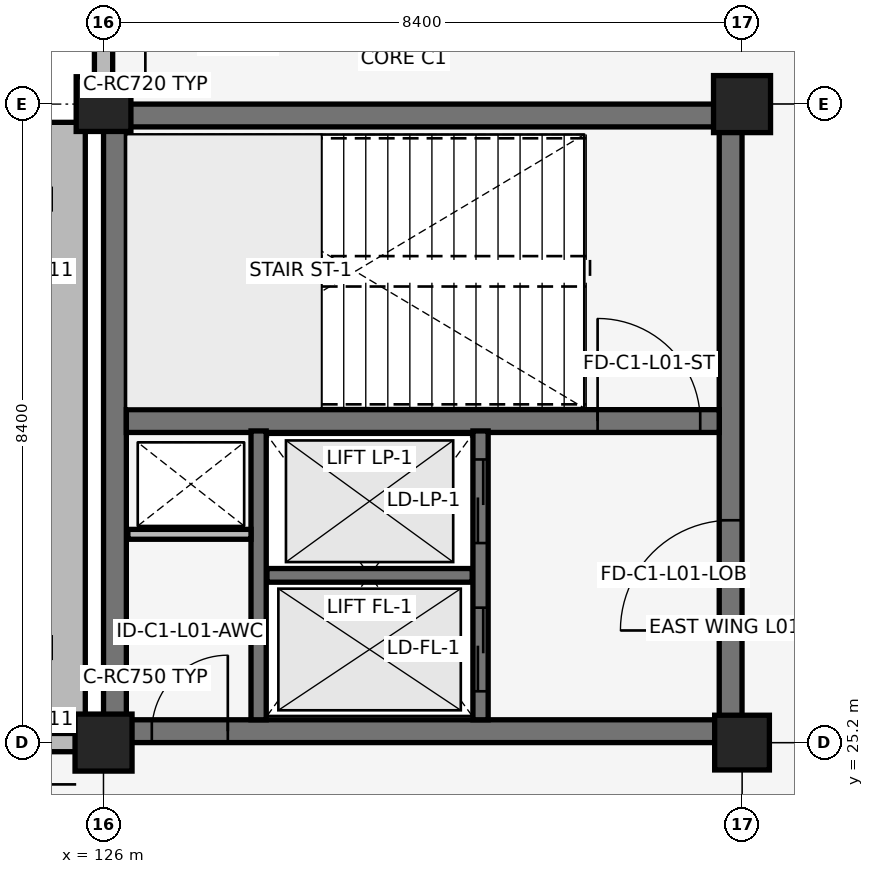
"""IFC4 building model, lengths in metres.
Left out: names, types, materials, properties, quantities, classifications, styles, units other than length and angle.
Written with IfcOpenShell. Run it as: python <this file> out.ifc"""

import sys

from ifc_helpers import new_model, si_unit, direction, frame, frame_2d, origin, origin_2d, place, context, subcontext, project, spatial, rectangle, extrude, element, fill, save


model = new_model("IFC4")
c1 = context("Model", 3, precision=1e-05, world=origin(), true_north=direction((0.0, 1.0)))
c2 = subcontext(c1, "Body", "Model", "MODEL_VIEW")
j1 = project(units=[si_unit("LENGTHUNIT", "METRE"), si_unit("PLANEANGLEUNIT", "RADIAN")], contexts=[c1])
p1 = place(None, origin())
s1 = spatial("IfcSite", under=j1, at=p1, CompositionType="ELEMENT")
p2 = place(p1, origin())
s2 = spatial("IfcBuilding", under=s1, at=p2, CompositionType="ELEMENT")
p3 = place(p2, frame((0.0, 0.0, 5.44)))
s3 = spatial("IfcBuildingStorey", under=s2, at=p3, CompositionType="ELEMENT", Elevation=5.44)
p4 = place(p3, frame((126.15, 25.35, 0.0), z_axis=(0.0, 0.0, 1.0), x_axis=(1.0, 0.0, 0.0)))
e1 = element("IfcWall", 1, at=p4, inside=s3, PredefinedType="SHEAR", context=c2, shape_type="SweptSolid", body=[
    extrude(rectangle(XDim=8.1, YDim=0.3, at=frame_2d((4.05, 0.0))), origin(), (0.0, 0.0, 1.0), 4.12),
])
p5 = place(p4, frame((0.485, 0.0, 0.0)))
e2 = element("IfcOpeningElement", 2, at=p5, cuts=e1, PredefinedType="OPENING", context=c2, shape_type="SweptSolid", body=[
    extrude(rectangle(XDim=1.0, YDim=2.15, at=frame_2d((0.5, 1.075))), frame((0.0, 0.16, 0.0), z_axis=(0.0, -1.0, 0.0), x_axis=(1.0, 0.0, 0.0)), (0.0, 0.0, 1.0), 0.32),
])
p6 = place(p3, frame((126.15, 33.45, 0.0), z_axis=(0.0, 0.0, 1.0), x_axis=(1.0, 0.0, 0.0)))
e3 = element("IfcWall", 3, at=p6, inside=s3, PredefinedType="SHEAR", context=c2, shape_type="SweptSolid", body=[
    extrude(rectangle(XDim=8.1, YDim=0.3, at=frame_2d((4.05, 0.0))), origin(), (0.0, 0.0, 1.0), 4.12),
])
p7 = place(p3, frame((126.15, 25.35, 0.0), z_axis=(0.0, 0.0, 1.0), x_axis=(0.0, 1.0, 0.0)))
e4 = element("IfcWall", 4, at=p7, inside=s3, PredefinedType="SHEAR", context=c2, shape_type="SweptSolid", body=[
    extrude(rectangle(XDim=8.1, YDim=0.3, at=frame_2d((4.05, 0.0))), origin(), (0.0, 0.0, 1.0), 4.12),
])
p8 = place(p3, frame((134.25, 25.35, 0.0), z_axis=(0.0, 0.0, 1.0), x_axis=(0.0, 1.0, 0.0)))
e5 = element("IfcWall", 5, at=p8, inside=s3, PredefinedType="SHEAR", context=c2, shape_type="SweptSolid", body=[
    extrude(rectangle(XDim=8.1, YDim=0.3, at=frame_2d((4.05, 0.0))), origin(), (0.0, 0.0, 1.0), 4.12),
])
p9 = place(p8, frame((1.325, 0.0, 0.0)))
e6 = element("IfcOpeningElement", 6, at=p9, cuts=e5, PredefinedType="OPENING", context=c2, shape_type="SweptSolid", body=[
    extrude(rectangle(XDim=1.45, YDim=2.15, at=frame_2d((0.725, 1.075))), frame((0.0, 0.16, 0.0), z_axis=(0.0, -1.0, 0.0), x_axis=(1.0, 0.0, 0.0)), (0.0, 0.0, 1.0), 0.32),
])
p10 = place(p3, frame((126.3, 29.43, 0.0), z_axis=(0.0, 0.0, 1.0), x_axis=(1.0, 0.0, 0.0)))
e7 = element("IfcWall", 7, at=p10, inside=s3, PredefinedType="SHEAR", context=c2, shape_type="SweptSolid", body=[
    extrude(rectangle(XDim=7.8, YDim=0.3, at=frame_2d((3.9, 0.0))), origin(), (0.0, 0.0, 1.0), 4.12),
])
p11 = place(p10, frame((6.2, 0.0, 0.0)))
e8 = element("IfcOpeningElement", 8, at=p11, cuts=e7, PredefinedType="OPENING", context=c2, shape_type="SweptSolid", body=[
    extrude(rectangle(XDim=1.35, YDim=2.15, at=frame_2d((0.675, 1.075))), frame((0.0, 0.16, 0.0), z_axis=(0.0, -1.0, 0.0), x_axis=(1.0, 0.0, 0.0)), (0.0, 0.0, 1.0), 0.32),
])
p12 = place(p3, frame((126.0, 25.2, 0.0), z_axis=(0.0, 0.0, 1.0), x_axis=(1.0, 0.0, 0.0)))
e9 = element("IfcColumn", 9, at=p12, inside=s3, PredefinedType="COLUMN", context=c2, shape_type="SweptSolid", body=[
    extrude(rectangle(XDim=0.75, YDim=0.75, at=origin_2d()), origin(), (0.0, 0.0, 1.0), 4.12),
])
for number, where, z_axis, x_axis in (
    (10, (126.0, 33.6, 0.0), (0.0, 0.0, 1.0), (1.0, 0.0, 0.0)),
    (11, (134.4, 25.2, 0.0), (0.0, 0.0, 1.0), (1.0, 0.0, 0.0)),
):
    element("IfcColumn", number, at=place(p3, frame(where, z_axis=z_axis, x_axis=x_axis)), inside=s3, PredefinedType="COLUMN", context=c2, shape_type="SweptSolid", body=[
        extrude(rectangle(XDim=0.72, YDim=0.72, at=origin_2d()), origin(), (0.0, 0.0, 1.0), 4.12),
    ])
p13 = place(p3, frame((134.4, 33.6, 0.0), z_axis=(0.0, 0.0, 1.0), x_axis=(1.0, 0.0, 0.0)))
e12 = element("IfcColumn", 12, at=p13, inside=s3, PredefinedType="COLUMN", context=c2, shape_type="SweptSolid", body=[
    extrude(rectangle(XDim=0.75, YDim=0.75, at=origin_2d()), origin(), (0.0, 0.0, 1.0), 4.12),
])
p14 = place(p3, frame((117.845, 25.2, 0.0), z_axis=(0.0, 0.0, 1.0), x_axis=(1.0, 0.0, 0.0)))
e13 = element("IfcWall", 13, at=p14, inside=s3, PredefinedType="SOLIDWALL", context=c2, shape_type="SweptSolid", body=[
    extrude(rectangle(XDim=7.795, YDim=0.24, at=frame_2d((3.897, 0.0))), origin(), (0.0, 0.0, 1.0), 3.37),
])
p15 = place(p14, frame((0.8, 0.0, 0.35)))
e14 = element("IfcOpeningElement", 14, at=p15, cuts=e13, PredefinedType="OPENING", context=c2, shape_type="SweptSolid", body=[
    extrude(rectangle(XDim=0.44, YDim=1.25, at=frame_2d((0.22, 0.625))), frame((0.0, 0.13, 0.0), z_axis=(0.0, -1.0, 0.0), x_axis=(1.0, 0.0, 0.0)), (0.0, 0.0, 1.0), 0.26),
])
p16 = place(p14, frame((2.239, 0.0, 0.35)))
e15 = element("IfcOpeningElement", 15, at=p16, cuts=e13, PredefinedType="OPENING", context=c2, shape_type="SweptSolid", body=[
    extrude(rectangle(XDim=0.44, YDim=1.25, at=frame_2d((0.22, 0.625))), frame((0.0, 0.13, 0.0), z_axis=(0.0, -1.0, 0.0), x_axis=(1.0, 0.0, 0.0)), (0.0, 0.0, 1.0), 0.26),
])
p17 = place(p14, frame((3.677, 0.0, 0.35)))
e16 = element("IfcOpeningElement", 16, at=p17, cuts=e13, PredefinedType="OPENING", context=c2, shape_type="SweptSolid", body=[
    extrude(rectangle(XDim=0.44, YDim=1.25, at=frame_2d((0.22, 0.625))), frame((0.0, 0.13, 0.0), z_axis=(0.0, -1.0, 0.0), x_axis=(1.0, 0.0, 0.0)), (0.0, 0.0, 1.0), 0.26),
])
p18 = place(p14, frame((5.116, 0.0, 0.35)))
e17 = element("IfcOpeningElement", 17, at=p18, cuts=e13, PredefinedType="OPENING", context=c2, shape_type="SweptSolid", body=[
    extrude(rectangle(XDim=0.44, YDim=1.25, at=frame_2d((0.22, 0.625))), frame((0.0, 0.13, 0.0), z_axis=(0.0, -1.0, 0.0), x_axis=(1.0, 0.0, 0.0)), (0.0, 0.0, 1.0), 0.26),
])
p19 = place(p14, frame((0.8, 0.0, 1.8)))
e18 = element("IfcOpeningElement", 18, at=p19, cuts=e13, PredefinedType="OPENING", context=c2, shape_type="SweptSolid", body=[
    extrude(rectangle(XDim=0.44, YDim=1.25, at=frame_2d((0.22, 0.625))), frame((0.0, 0.13, 0.0), z_axis=(0.0, -1.0, 0.0), x_axis=(1.0, 0.0, 0.0)), (0.0, 0.0, 1.0), 0.26),
])
p20 = place(p14, frame((2.239, 0.0, 1.8)))
e19 = element("IfcOpeningElement", 19, at=p20, cuts=e13, PredefinedType="OPENING", context=c2, shape_type="SweptSolid", body=[
    extrude(rectangle(XDim=0.44, YDim=1.25, at=frame_2d((0.22, 0.625))), frame((0.0, 0.13, 0.0), z_axis=(0.0, -1.0, 0.0), x_axis=(1.0, 0.0, 0.0)), (0.0, 0.0, 1.0), 0.26),
])
p21 = place(p14, frame((3.677, 0.0, 1.8)))
e20 = element("IfcOpeningElement", 20, at=p21, cuts=e13, PredefinedType="OPENING", context=c2, shape_type="SweptSolid", body=[
    extrude(rectangle(XDim=0.44, YDim=1.25, at=frame_2d((0.22, 0.625))), frame((0.0, 0.13, 0.0), z_axis=(0.0, -1.0, 0.0), x_axis=(1.0, 0.0, 0.0)), (0.0, 0.0, 1.0), 0.26),
])
p22 = place(p14, frame((5.116, 0.0, 1.8)))
e21 = element("IfcOpeningElement", 21, at=p22, cuts=e13, PredefinedType="OPENING", context=c2, shape_type="SweptSolid", body=[
    extrude(rectangle(XDim=0.44, YDim=1.25, at=frame_2d((0.22, 0.625))), frame((0.0, 0.13, 0.0), z_axis=(0.0, -1.0, 0.0), x_axis=(1.0, 0.0, 0.0)), (0.0, 0.0, 1.0), 0.26),
])
p23 = place(p3, frame((125.52, 25.44, 0.0), z_axis=(0.0, 0.0, 1.0), x_axis=(0.0, 1.0, 0.0)))
e22 = element("IfcWall", 22, at=p23, inside=s3, PredefinedType="SOLIDWALL", context=c2, shape_type="SweptSolid", body=[
    extrude(rectangle(XDim=7.92, YDim=0.48, at=frame_2d((3.96, 0.0))), origin(), (0.0, 0.0, 1.0), 4.42),
])
p24 = place(p3, frame((126.0, 33.945, 0.0), z_axis=(0.0, 0.0, 1.0), x_axis=(0.0, 1.0, 0.0)))
e23 = element("IfcWall", 23, at=p24, inside=s3, PredefinedType="SOLIDWALL", context=c2, shape_type="SweptSolid", body=[
    extrude(rectangle(XDim=7.695, YDim=0.24, at=frame_2d((3.847, 0.0))), origin(), (0.0, 0.0, 1.0), 3.37),
])
p25 = place(p24, frame((0.79, 0.0, 0.35)))
e24 = element("IfcOpeningElement", 24, at=p25, cuts=e23, PredefinedType="OPENING", context=c2, shape_type="SweptSolid", body=[
    extrude(rectangle(XDim=0.44, YDim=1.25, at=frame_2d((0.22, 0.625))), frame((0.0, 0.13, 0.0), z_axis=(0.0, -1.0, 0.0), x_axis=(1.0, 0.0, 0.0)), (0.0, 0.0, 1.0), 0.26),
])
p26 = place(p24, frame((2.208, 0.0, 0.35)))
e25 = element("IfcOpeningElement", 25, at=p26, cuts=e23, PredefinedType="OPENING", context=c2, shape_type="SweptSolid", body=[
    extrude(rectangle(XDim=0.44, YDim=1.25, at=frame_2d((0.22, 0.625))), frame((0.0, 0.13, 0.0), z_axis=(0.0, -1.0, 0.0), x_axis=(1.0, 0.0, 0.0)), (0.0, 0.0, 1.0), 0.26),
])
p27 = place(p24, frame((3.627, 0.0, 0.35)))
e26 = element("IfcOpeningElement", 26, at=p27, cuts=e23, PredefinedType="OPENING", context=c2, shape_type="SweptSolid", body=[
    extrude(rectangle(XDim=0.44, YDim=1.25, at=frame_2d((0.22, 0.625))), frame((0.0, 0.13, 0.0), z_axis=(0.0, -1.0, 0.0), x_axis=(1.0, 0.0, 0.0)), (0.0, 0.0, 1.0), 0.26),
])
p28 = place(p24, frame((5.046, 0.0, 0.35)))
e27 = element("IfcOpeningElement", 27, at=p28, cuts=e23, PredefinedType="OPENING", context=c2, shape_type="SweptSolid", body=[
    extrude(rectangle(XDim=0.44, YDim=1.25, at=frame_2d((0.22, 0.625))), frame((0.0, 0.13, 0.0), z_axis=(0.0, -1.0, 0.0), x_axis=(1.0, 0.0, 0.0)), (0.0, 0.0, 1.0), 0.26),
])
p29 = place(p24, frame((6.466, 0.0, 0.35)))
e28 = element("IfcOpeningElement", 28, at=p29, cuts=e23, PredefinedType="OPENING", context=c2, shape_type="SweptSolid", body=[
    extrude(rectangle(XDim=0.44, YDim=1.25, at=frame_2d((0.22, 0.625))), frame((0.0, 0.13, 0.0), z_axis=(0.0, -1.0, 0.0), x_axis=(1.0, 0.0, 0.0)), (0.0, 0.0, 1.0), 0.26),
])
p30 = place(p24, frame((0.79, 0.0, 1.8)))
e29 = element("IfcOpeningElement", 29, at=p30, cuts=e23, PredefinedType="OPENING", context=c2, shape_type="SweptSolid", body=[
    extrude(rectangle(XDim=0.44, YDim=1.25, at=frame_2d((0.22, 0.625))), frame((0.0, 0.13, 0.0), z_axis=(0.0, -1.0, 0.0), x_axis=(1.0, 0.0, 0.0)), (0.0, 0.0, 1.0), 0.26),
])
p31 = place(p24, frame((2.208, 0.0, 1.8)))
e30 = element("IfcOpeningElement", 30, at=p31, cuts=e23, PredefinedType="OPENING", context=c2, shape_type="SweptSolid", body=[
    extrude(rectangle(XDim=0.44, YDim=1.25, at=frame_2d((0.22, 0.625))), frame((0.0, 0.13, 0.0), z_axis=(0.0, -1.0, 0.0), x_axis=(1.0, 0.0, 0.0)), (0.0, 0.0, 1.0), 0.26),
])
p32 = place(p24, frame((3.627, 0.0, 1.8)))
e31 = element("IfcOpeningElement", 31, at=p32, cuts=e23, PredefinedType="OPENING", context=c2, shape_type="SweptSolid", body=[
    extrude(rectangle(XDim=0.44, YDim=1.25, at=frame_2d((0.22, 0.625))), frame((0.0, 0.13, 0.0), z_axis=(0.0, -1.0, 0.0), x_axis=(1.0, 0.0, 0.0)), (0.0, 0.0, 1.0), 0.26),
])
p33 = place(p24, frame((5.046, 0.0, 1.8)))
e32 = element("IfcOpeningElement", 32, at=p33, cuts=e23, PredefinedType="OPENING", context=c2, shape_type="SweptSolid", body=[
    extrude(rectangle(XDim=0.44, YDim=1.25, at=frame_2d((0.22, 0.625))), frame((0.0, 0.13, 0.0), z_axis=(0.0, -1.0, 0.0), x_axis=(1.0, 0.0, 0.0)), (0.0, 0.0, 1.0), 0.26),
])
p34 = place(p24, frame((6.466, 0.0, 1.8)))
e33 = element("IfcOpeningElement", 33, at=p34, cuts=e23, PredefinedType="OPENING", context=c2, shape_type="SweptSolid", body=[
    extrude(rectangle(XDim=0.44, YDim=1.25, at=frame_2d((0.22, 0.625))), frame((0.0, 0.13, 0.0), z_axis=(0.0, -1.0, 0.0), x_axis=(1.0, 0.0, 0.0)), (0.0, 0.0, 1.0), 0.26),
])
p35 = place(p3, frame((130.96, 25.5, 0.0), z_axis=(0.0, 0.0, 1.0), x_axis=(0.0, 1.0, 0.0)))
e34 = element("IfcWall", 34, at=p35, inside=s3, PredefinedType="SHEAR", context=c2, shape_type="SweptSolid", body=[
    extrude(rectangle(XDim=3.8, YDim=0.2, at=frame_2d((1.9, 0.0))), origin(), (0.0, 0.0, 1.0), 3.44),
])
p36 = place(p35, frame((0.375, 0.0, 0.0)))
e35 = element("IfcOpeningElement", 35, at=p36, cuts=e34, PredefinedType="OPENING", context=c2, shape_type="SweptSolid", body=[
    extrude(rectangle(XDim=1.1, YDim=2.15, at=frame_2d((0.55, 1.075))), frame((0.0, 0.11, 0.0), z_axis=(0.0, -1.0, 0.0), x_axis=(1.0, 0.0, 0.0)), (0.0, 0.0, 1.0), 0.22),
])
p37 = place(p35, frame((2.325, 0.0, 0.0)))
e36 = element("IfcOpeningElement", 36, at=p37, cuts=e34, PredefinedType="OPENING", context=c2, shape_type="SweptSolid", body=[
    extrude(rectangle(XDim=1.1, YDim=2.15, at=frame_2d((0.55, 1.075))), frame((0.0, 0.11, 0.0), z_axis=(0.0, -1.0, 0.0), x_axis=(1.0, 0.0, 0.0)), (0.0, 0.0, 1.0), 0.22),
])
p38 = place(p3, frame((128.04, 25.5, 0.0), z_axis=(0.0, 0.0, 1.0), x_axis=(0.0, 1.0, 0.0)))
e37 = element("IfcWall", 37, at=p38, inside=s3, PredefinedType="SHEAR", context=c2, shape_type="SweptSolid", body=[
    extrude(rectangle(XDim=3.8, YDim=0.2, at=frame_2d((1.9, 0.0))), origin(), (0.0, 0.0, 1.0), 3.44),
])
p39 = place(p3, frame((128.15, 27.4, 0.0), z_axis=(0.0, 0.0, 1.0), x_axis=(1.0, 0.0, 0.0)))
e38 = element("IfcWall", 38, at=p39, inside=s3, PredefinedType="SHEAR", context=c2, shape_type="SweptSolid", body=[
    extrude(rectangle(XDim=2.7, YDim=0.18, at=frame_2d((1.35, 0.0))), origin(), (0.0, 0.0, 1.0), 4.12),
])
p40 = place(p3, frame((126.32, 27.94, 0.0), z_axis=(0.0, 0.0, 1.0), x_axis=(1.0, 0.0, 0.0)))
e39 = element("IfcWall", 39, at=p40, inside=s3, PredefinedType="PARTITIONING", context=c2, shape_type="SweptSolid", body=[
    extrude(rectangle(XDim=1.62, YDim=0.13, at=frame_2d((0.81, 0.0))), origin(), (0.0, 0.0, 1.0), 3.37),
])
p41 = place(p11, origin())
e40 = element("IfcDoor", 40, at=p41, inside=s3, OperationType="SINGLE_SWING_LEFT", PredefinedType="DOOR", context=c2, shape_type="SweptSolid", body=[
    extrude(rectangle(XDim=1.35, YDim=2.15, at=frame_2d((0.675, 1.075))), frame((0.0, 0.025, 0.0), z_axis=(0.0, -1.0, 0.0), x_axis=(1.0, 0.0, 0.0)), (0.0, 0.0, 1.0), 0.05),
])
fill(e8, e40)
p42 = place(p36, origin())
e41 = element("IfcDoor", 41, at=p42, inside=s3, OperationType="SLIDING_TO_LEFT", PredefinedType="DOOR", context=c2, shape_type="SweptSolid", body=[
    extrude(rectangle(XDim=1.1, YDim=2.15, at=frame_2d((0.55, 1.075))), frame((0.0, 0.025, 0.0), z_axis=(0.0, -1.0, 0.0), x_axis=(1.0, 0.0, 0.0)), (0.0, 0.0, 1.0), 0.05),
])
fill(e35, e41)
p43 = place(p37, origin())
e42 = element("IfcDoor", 42, at=p43, inside=s3, OperationType="SLIDING_TO_LEFT", PredefinedType="DOOR", context=c2, shape_type="SweptSolid", body=[
    extrude(rectangle(XDim=1.1, YDim=2.15, at=frame_2d((0.55, 1.075))), frame((0.0, 0.025, 0.0), z_axis=(0.0, -1.0, 0.0), x_axis=(1.0, 0.0, 0.0)), (0.0, 0.0, 1.0), 0.05),
])
fill(e36, e42)
p44 = place(p9, origin())
e43 = element("IfcDoor", 43, at=p44, inside=s3, OperationType="DOUBLE_DOOR_SINGLE_SWING", PredefinedType="DOOR", context=c2, shape_type="SweptSolid", body=[
    extrude(rectangle(XDim=1.45, YDim=2.15, at=frame_2d((0.725, 1.075))), frame((0.0, 0.025, 0.0), z_axis=(0.0, -1.0, 0.0), x_axis=(1.0, 0.0, 0.0)), (0.0, 0.0, 1.0), 0.05),
])
fill(e6, e43)
p45 = place(p5, origin())
e44 = element("IfcDoor", 44, at=p45, inside=s3, OperationType="SINGLE_SWING_RIGHT", PredefinedType="DOOR", context=c2, shape_type="SweptSolid", body=[
    extrude(rectangle(XDim=1.0, YDim=2.15, at=frame_2d((0.5, 1.075))), frame((0.0, 0.025, 0.0), z_axis=(0.0, -1.0, 0.0), x_axis=(1.0, 0.0, 0.0)), (0.0, 0.0, 1.0), 0.05),
])
fill(e2, e44)
save(model, sys.argv[1])
